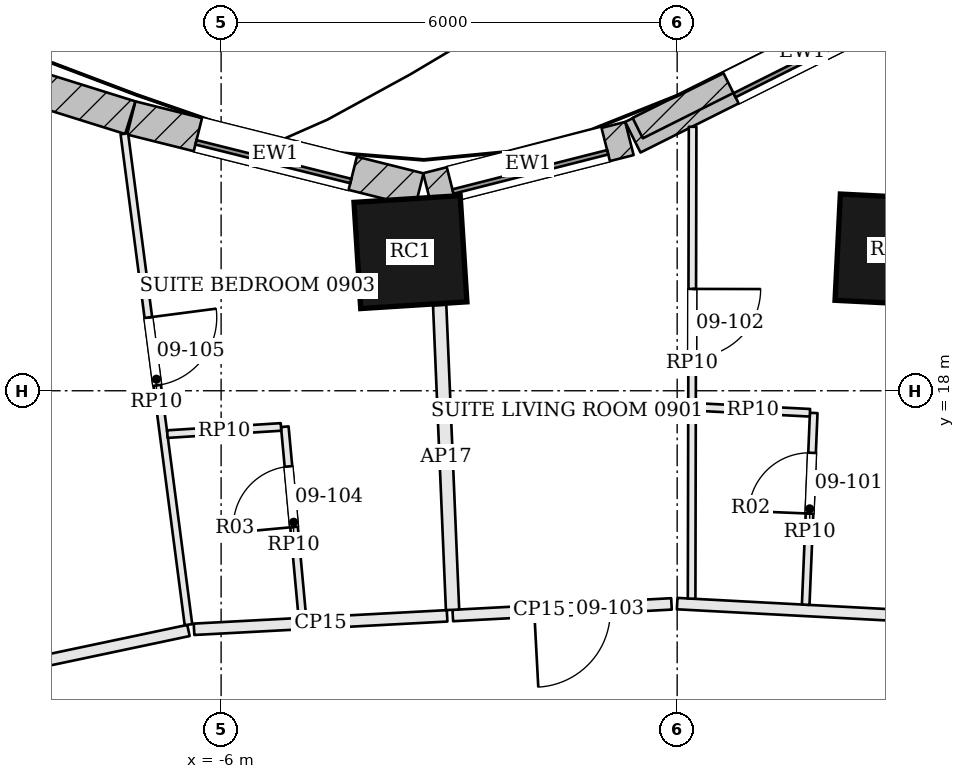
"""IFC4 building model, lengths in metres.
Left out: names, types, materials, properties, quantities, classifications, styles, units other than length and angle.
Written with IfcOpenShell. Run it as: python <this file> out.ifc"""

import sys

from ifc_helpers import new_model, si_unit, direction, frame, frame_2d, origin, origin_2d, place, context, subcontext, project, spatial, rectangle, extrude, element, fill, save


model = new_model("IFC4")
c1 = context("Model", 3, precision=1e-05, world=origin(), true_north=direction((0.0, 1.0)))
c2 = subcontext(c1, "Body", "Model", "MODEL_VIEW")
j1 = project(units=[si_unit("LENGTHUNIT", "METRE"), si_unit("PLANEANGLEUNIT", "RADIAN")], contexts=[c1])
p1 = place(None, origin())
s1 = spatial("IfcSite", under=j1, at=p1, CompositionType="ELEMENT")
p2 = place(p1, origin())
s2 = spatial("IfcBuilding", under=s1, at=p2, CompositionType="ELEMENT")
p3 = place(p2, frame((0.0, 0.0, 48.3)))
s3 = spatial("IfcBuildingStorey", under=s2, at=p3, CompositionType="ELEMENT", Elevation=48.3)
for number, where, z_axis, x_axis in (
    (1, (2.811, 19.854, 0.0), (0.0, 0.0, 1.0), (-0.999, 0.05, 0.0)),
    (2, (-3.509, 19.824, 0.0), (0.0, 0.0, 1.0), (-0.998, -0.063, 0.0)),
):
    element("IfcColumn", number, at=place(p3, frame(where, z_axis=z_axis, x_axis=x_axis)), inside=s3, PredefinedType="COLUMN", context=c2, shape_type="SweptSolid", body=[
        extrude(rectangle(XDim=1.4, YDim=1.4, at=origin_2d()), origin(), (0.0, 0.0, 1.0), 3.6),
    ])
p4 = place(p3, frame((3.877, 23.568, 0.0), z_axis=(0.0, 0.0, 1.0), x_axis=(-0.894241088759, -0.447585606532, 0.0)))
e3 = element("IfcWall", 3, at=p4, inside=s3, PredefinedType="SOLIDWALL", context=c2, shape_type="SweptSolid", body=[
    extrude(rectangle(XDim=4.987, YDim=0.45, at=frame_2d((2.494, 0.0))), origin(), (0.0, 0.0, 1.0), 3.4),
])
p5 = place(p4, frame((1.444, 0.0, 0.9)))
e4 = element("IfcOpeningElement", 4, at=p5, cuts=e3, PredefinedType="OPENING", context=c2, shape_type="SweptSolid", body=[
    extrude(rectangle(XDim=2.1, YDim=2.0, at=frame_2d((1.05, 1.0))), frame((0.0, 0.235, 0.0), z_axis=(0.0, -1.0, 0.0), x_axis=(1.0, 0.0, 0.0)), (0.0, 0.0, 1.0), 0.47),
])
p6 = place(p3, frame((-0.628, 21.319, 0.0), z_axis=(0.0, 0.0, 1.0), x_axis=(-0.969240543873, -0.246115355295, 0.0)))
e5 = element("IfcWall", 5, at=p6, inside=s3, PredefinedType="SOLIDWALL", context=c2, shape_type="SweptSolid", body=[
    extrude(rectangle(XDim=2.743, YDim=0.45, at=frame_2d((1.372, 0.0))), origin(), (0.0, 0.0, 1.0), 3.4),
])
p7 = place(p6, frame((0.321, 0.0, 0.9)))
e6 = element("IfcOpeningElement", 6, at=p7, cuts=e5, PredefinedType="OPENING", context=c2, shape_type="SweptSolid", body=[
    extrude(rectangle(XDim=2.1, YDim=2.0, at=frame_2d((1.05, 1.0))), frame((0.0, 0.235, 0.0), z_axis=(0.0, -1.0, 0.0), x_axis=(1.0, 0.0, 0.0)), (0.0, 0.0, 1.0), 0.47),
])
p8 = place(p3, frame((-3.392, 20.642, 0.0), z_axis=(0.0, 0.0, 1.0), x_axis=(-0.970168229467, 0.242432684539, 0.0)))
e7 = element("IfcWall", 7, at=p8, inside=s3, PredefinedType="SOLIDWALL", context=c2, shape_type="SweptSolid", body=[
    extrude(rectangle(XDim=3.906, YDim=0.45, at=frame_2d((1.953, 0.0))), origin(), (0.0, 0.0, 1.0), 3.4),
])
p9 = place(p8, frame((0.903, 0.0, 0.9)))
e8 = element("IfcOpeningElement", 8, at=p9, cuts=e7, PredefinedType="OPENING", context=c2, shape_type="SweptSolid", body=[
    extrude(rectangle(XDim=2.1, YDim=2.0, at=frame_2d((1.05, 1.0))), frame((0.0, 0.235, 0.0), z_axis=(0.0, -1.0, 0.0), x_axis=(1.0, 0.0, 0.0)), (0.0, 0.0, 1.0), 0.47),
])
p10 = place(p3, frame((-7.196, 21.593, 0.0), z_axis=(0.0, 0.0, 1.0), x_axis=(-0.954471218741, 0.298303021432, 0.0)))
e9 = element("IfcWall", 9, at=p10, inside=s3, PredefinedType="SOLIDWALL", context=c2, shape_type="SweptSolid", body=[
    extrude(rectangle(XDim=4.96, YDim=0.45, at=frame_2d((2.48, 0.0))), origin(), (0.0, 0.0, 1.0), 3.4),
])
p11 = place(p10, frame((1.43, 0.0, 0.9)))
e10 = element("IfcOpeningElement", 10, at=p11, cuts=e9, PredefinedType="OPENING", context=c2, shape_type="SweptSolid", body=[
    extrude(rectangle(XDim=2.1, YDim=2.0, at=frame_2d((1.05, 1.0))), frame((0.0, 0.235, 0.0), z_axis=(0.0, -1.0, 0.0), x_axis=(1.0, 0.0, 0.0)), (0.0, 0.0, 1.0), 0.47),
])
p12 = place(p3, frame((3.763, 23.599, 3.6), z_axis=(0.0, 0.0, 1.0), x_axis=(-0.894243576514, -0.447580636158, 0.0)))
e11 = element("IfcWall", 11, at=p12, inside=s3, PredefinedType="PARAPET", context=c2, shape_type="SweptSolid", body=[
    extrude(rectangle(XDim=4.789, YDim=0.3, at=frame_2d((2.394, 0.0))), origin(), (0.0, 0.0, 1.0), 1.1),
])
p13 = place(p3, frame((6.281, 14.866, 0.0), z_axis=(0.0, 0.0, 1.0), x_axis=(-0.998587429539, 0.053133281163, 0.0)))
e12 = element("IfcWall", 12, at=p13, inside=s3, PredefinedType="PARTITIONING", context=c2, shape_type="SweptSolid", body=[
    extrude(rectangle(XDim=6.29, YDim=0.15, at=frame_2d((3.145, 0.0))), origin(), (0.0, 0.0, 1.0), 2.68),
])
p14 = place(p3, frame((-0.075, 15.196, 0.0), z_axis=(0.0, 0.0, 1.0), x_axis=(-0.998591959352, -0.053048079307, 0.0)))
e13 = element("IfcWall", 13, at=p14, inside=s3, PredefinedType="PARTITIONING", context=c2, shape_type="SweptSolid", body=[
    extrude(rectangle(XDim=2.881, YDim=0.15, at=frame_2d((1.44, 0.0))), origin(), (0.0, 0.0, 1.0), 2.68),
])
p15 = place(p14, frame((0.808, 0.0, 0.0)))
e14 = element("IfcOpeningElement", 14, at=p15, cuts=e13, PredefinedType="OPENING", context=c2, shape_type="SweptSolid", body=[
    extrude(rectangle(XDim=1.0, YDim=2.1, at=frame_2d((0.5, 1.05))), frame((0.0, 0.085, 0.0), z_axis=(0.0, -1.0, 0.0), x_axis=(1.0, 0.0, 0.0)), (0.0, 0.0, 1.0), 0.17),
])
p16 = place(p3, frame((-3.125, 19.127, 0.0), z_axis=(0.0, 0.0, 1.0), x_axis=(0.042285996913, -0.99910554721, 0.0)))
e15 = element("IfcWall", 15, at=p16, inside=s3, PredefinedType="PARTITIONING", context=c2, shape_type="SweptSolid", body=[
    extrude(rectangle(XDim=4.013, YDim=0.175, at=frame_2d((2.006, 0.0))), origin(), (0.0, 0.0, 1.0), 2.68),
])
p17 = place(p3, frame((-3.027, 15.039, 0.0), z_axis=(0.0, 0.0, 1.0), x_axis=(-0.998589773409, -0.053089212123, 0.0)))
e16 = element("IfcWall", 16, at=p17, inside=s3, PredefinedType="PARTITIONING", context=c2, shape_type="SweptSolid", body=[
    extrude(rectangle(XDim=3.334, YDim=0.15, at=frame_2d((1.667, 0.0))), origin(), (0.0, 0.0, 1.0), 2.68),
])
p18 = place(p3, frame((-6.43, 14.846, 0.0), z_axis=(0.0, 0.0, 1.0), x_axis=(-0.978470502428, -0.206386714394, 0.0)))
e17 = element("IfcWall", 17, at=p18, inside=s3, PredefinedType="PARTITIONING", context=c2, shape_type="SweptSolid", body=[
    extrude(rectangle(XDim=5.069, YDim=0.15, at=frame_2d((2.534, 0.0))), origin(), (0.0, 0.0, 1.0), 2.68),
])
p19 = place(p18, frame((3.8, 0.0, 0.0)))
e18 = element("IfcOpeningElement", 18, at=p19, cuts=e17, PredefinedType="OPENING", context=c2, shape_type="SweptSolid", body=[
    extrude(rectangle(XDim=1.0, YDim=2.1, at=frame_2d((0.5, 1.05))), frame((0.0, 0.085, 0.0), z_axis=(0.0, -1.0, 0.0), x_axis=(1.0, 0.0, 0.0)), (0.0, 0.0, 1.0), 0.17),
])
p20 = place(p3, frame((0.203, 21.473, 0.0), z_axis=(0.0, 0.0, 1.0), x_axis=(-0.002044985499, -0.999997909015, 0.0)))
e19 = element("IfcWall", 19, at=p20, inside=s3, PredefinedType="PARTITIONING", context=c2, shape_type="SweptSolid", body=[
    extrude(rectangle(XDim=6.208, YDim=0.1, at=frame_2d((3.104, 0.0))), origin(), (0.0, 0.0, 1.0), 2.934),
])
p21 = place(p20, frame((2.133, 0.0, 0.0)))
e20 = element("IfcOpeningElement", 20, at=p21, cuts=e19, PredefinedType="OPENING", context=c2, shape_type="SweptSolid", body=[
    extrude(rectangle(XDim=0.9, YDim=2.4, at=frame_2d((0.45, 1.2))), frame((0.0, 0.06, 0.0), z_axis=(0.0, -1.0, 0.0), x_axis=(1.0, 0.0, 0.0)), (0.0, 0.0, 1.0), 0.12),
])
p22 = place(p3, frame((1.691, 15.185, 0.0), z_axis=(0.0, 0.0, 1.0), x_axis=(0.041767275245, 0.999127366615, 0.0)))
e21 = element("IfcWall", 21, at=p22, inside=s3, PredefinedType="PARTITIONING", context=c2, shape_type="SweptSolid", body=[
    extrude(rectangle(XDim=2.525, YDim=0.1, at=frame_2d((1.263, 0.0))), origin(), (0.0, 0.0, 1.0), 2.934),
])
p23 = place(p22, frame((1.2, 0.0, 0.0)))
e22 = element("IfcOpeningElement", 22, at=p23, cuts=e21, PredefinedType="OPENING", context=c2, shape_type="SweptSolid", body=[
    extrude(rectangle(XDim=0.8, YDim=2.1, at=frame_2d((0.4, 1.05))), frame((0.0, 0.06, 0.0), z_axis=(0.0, -1.0, 0.0), x_axis=(1.0, 0.0, 0.0)), (0.0, 0.0, 1.0), 0.12),
])
p24 = place(p3, frame((1.747, 17.71, 0.0), z_axis=(0.0, 0.0, 1.0), x_axis=(-0.998699138712, 0.050990492611, 0.0)))
e23 = element("IfcWall", 23, at=p24, inside=s3, PredefinedType="PARTITIONING", context=c2, shape_type="SweptSolid", body=[
    extrude(rectangle(XDim=1.503, YDim=0.1, at=frame_2d((0.752, 0.0))), origin(), (0.0, 0.0, 1.0), 2.934),
])
p25 = place(p3, frame((-7.273, 21.381, 0.0), z_axis=(0.0, 0.0, 1.0), x_axis=(0.129472190921, -0.991583053394, 0.0)))
e24 = element("IfcWall", 24, at=p25, inside=s3, PredefinedType="PARTITIONING", context=c2, shape_type="SweptSolid", body=[
    extrude(rectangle(XDim=6.513, YDim=0.1, at=frame_2d((3.257, 0.0))), origin(), (0.0, 0.0, 1.0), 2.934),
])
p26 = place(p25, frame((2.438, 0.0, 0.0)))
e25 = element("IfcOpeningElement", 25, at=p26, cuts=e24, PredefinedType="OPENING", context=c2, shape_type="SweptSolid", body=[
    extrude(rectangle(XDim=0.9, YDim=2.4, at=frame_2d((0.45, 1.2))), frame((0.0, 0.06, 0.0), z_axis=(0.0, -1.0, 0.0), x_axis=(1.0, 0.0, 0.0)), (0.0, 0.0, 1.0), 0.12),
])
p27 = place(p3, frame((-4.93, 15.013, 0.0), z_axis=(0.0, 0.0, 1.0), x_axis=(-0.09194789711, 0.995763819496, 0.0)))
e26 = element("IfcWall", 26, at=p27, inside=s3, PredefinedType="PARTITIONING", context=c2, shape_type="SweptSolid", body=[
    extrude(rectangle(XDim=2.525, YDim=0.1, at=frame_2d((1.263, 0.0))), origin(), (0.0, 0.0, 1.0), 2.934),
])
p28 = place(p27, frame((1.2, 0.0, 0.0)))
e27 = element("IfcOpeningElement", 27, at=p28, cuts=e26, PredefinedType="OPENING", context=c2, shape_type="SweptSolid", body=[
    extrude(rectangle(XDim=0.8, YDim=2.1, at=frame_2d((0.4, 1.05))), frame((0.0, 0.06, 0.0), z_axis=(0.0, -1.0, 0.0), x_axis=(1.0, 0.0, 0.0)), (0.0, 0.0, 1.0), 0.12),
])
p29 = place(p3, frame((-5.212, 17.524, 0.0), z_axis=(0.0, 0.0, 1.0), x_axis=(-0.998018174443, -0.062926333769, 0.0)))
e28 = element("IfcWall", 28, at=p29, inside=s3, PredefinedType="PARTITIONING", context=c2, shape_type="SweptSolid", body=[
    extrude(rectangle(XDim=1.498, YDim=0.1, at=frame_2d((0.749, 0.0))), origin(), (0.0, 0.0, 1.0), 2.934),
])
p30 = place(p5, origin())
e29 = element("IfcWindow", 29, at=p30, inside=s3, PartitioningType="SINGLE_PANEL", PredefinedType="WINDOW", context=c2, shape_type="SweptSolid", body=[
    extrude(rectangle(XDim=2.1, YDim=2.0, at=frame_2d((1.05, 1.0))), frame((0.0, 0.135, 0.0), z_axis=(0.0, -1.0, 0.0), x_axis=(1.0, 0.0, 0.0)), (0.0, 0.0, 1.0), 0.06),
])
fill(e4, e29)
p31 = place(p7, origin())
e30 = element("IfcWindow", 30, at=p31, inside=s3, PartitioningType="SINGLE_PANEL", PredefinedType="WINDOW", context=c2, shape_type="SweptSolid", body=[
    extrude(rectangle(XDim=2.1, YDim=2.0, at=frame_2d((1.05, 1.0))), frame((0.0, 0.135, 0.0), z_axis=(0.0, -1.0, 0.0), x_axis=(1.0, 0.0, 0.0)), (0.0, 0.0, 1.0), 0.06),
])
fill(e6, e30)
p32 = place(p9, origin())
e31 = element("IfcWindow", 31, at=p32, inside=s3, PartitioningType="SINGLE_PANEL", PredefinedType="WINDOW", context=c2, shape_type="SweptSolid", body=[
    extrude(rectangle(XDim=2.1, YDim=2.0, at=frame_2d((1.05, 1.0))), frame((0.0, 0.135, 0.0), z_axis=(0.0, -1.0, 0.0), x_axis=(1.0, 0.0, 0.0)), (0.0, 0.0, 1.0), 0.06),
])
fill(e8, e31)
p33 = place(p23, origin())
e32 = element("IfcDoor", 32, at=p33, inside=s3, OperationType="SINGLE_SWING_LEFT", PredefinedType="DOOR", context=c2, shape_type="SweptSolid", body=[
    extrude(rectangle(XDim=0.8, YDim=2.1, at=frame_2d((0.4, 1.05))), frame((0.0, 0.025, 0.0), z_axis=(0.0, -1.0, 0.0), x_axis=(1.0, 0.0, 0.0)), (0.0, 0.0, 1.0), 0.05),
])
fill(e22, e32)
p34 = place(p21, origin())
e33 = element("IfcDoor", 33, at=p34, inside=s3, OperationType="SINGLE_SWING_LEFT", PredefinedType="DOOR", context=c2, shape_type="SweptSolid", body=[
    extrude(rectangle(XDim=0.9, YDim=2.4, at=frame_2d((0.45, 1.2))), frame((0.0, 0.025, 0.0), z_axis=(0.0, -1.0, 0.0), x_axis=(1.0, 0.0, 0.0)), (0.0, 0.0, 1.0), 0.05),
])
fill(e20, e33)
p35 = place(p15, origin())
e34 = element("IfcDoor", 34, at=p35, inside=s3, OperationType="SINGLE_SWING_RIGHT", PredefinedType="DOOR", context=c2, shape_type="SweptSolid", body=[
    extrude(rectangle(XDim=1.0, YDim=2.1, at=frame_2d((0.5, 1.05))), frame((0.0, 0.025, 0.0), z_axis=(0.0, -1.0, 0.0), x_axis=(1.0, 0.0, 0.0)), (0.0, 0.0, 1.0), 0.05),
])
fill(e14, e34)
p36 = place(p28, origin())
e35 = element("IfcDoor", 35, at=p36, inside=s3, OperationType="SINGLE_SWING_LEFT", PredefinedType="DOOR", context=c2, shape_type="SweptSolid", body=[
    extrude(rectangle(XDim=0.8, YDim=2.1, at=frame_2d((0.4, 1.05))), frame((0.0, 0.025, 0.0), z_axis=(0.0, -1.0, 0.0), x_axis=(1.0, 0.0, 0.0)), (0.0, 0.0, 1.0), 0.05),
])
fill(e27, e35)
p37 = place(p26, origin())
e36 = element("IfcDoor", 36, at=p37, inside=s3, OperationType="SINGLE_SWING_LEFT", PredefinedType="DOOR", context=c2, shape_type="SweptSolid", body=[
    extrude(rectangle(XDim=0.9, YDim=2.4, at=frame_2d((0.45, 1.2))), frame((0.0, 0.025, 0.0), z_axis=(0.0, -1.0, 0.0), x_axis=(1.0, 0.0, 0.0)), (0.0, 0.0, 1.0), 0.05),
])
fill(e25, e36)
save(model, sys.argv[1])
